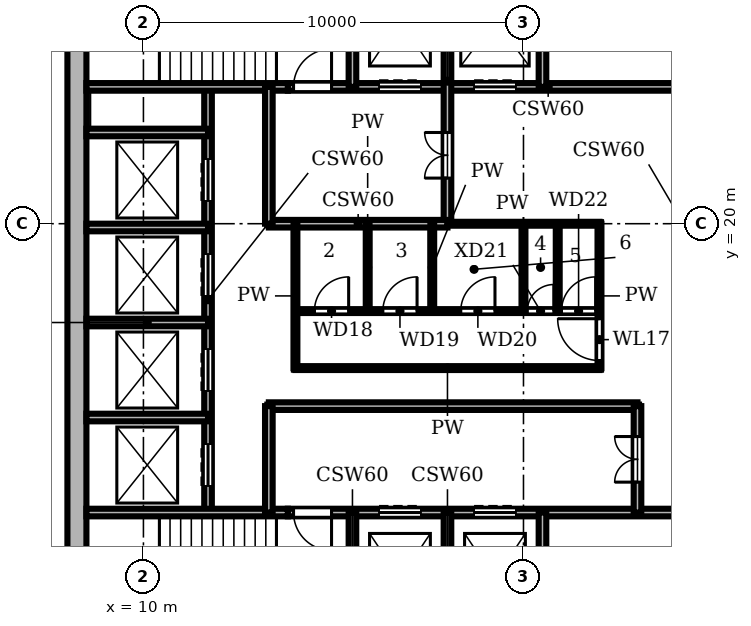
"""IFC4 building model, lengths in metres.
Left out: names, types, materials, properties, quantities, classifications, styles, units other than length and angle.
Written with IfcOpenShell. Run it as: python <this file> out.ifc"""

import sys

from ifc_helpers import new_model, si_unit, direction, frame, frame_2d, origin, place, context, subcontext, project, spatial, rectangle, extrude, element, fill, save


model = new_model("IFC4")
c1 = context("Model", 3, precision=1e-05, world=origin(), true_north=direction((0.0, 1.0)))
c2 = subcontext(c1, "Body", "Model", "MODEL_VIEW")
j1 = project(units=[si_unit("LENGTHUNIT", "METRE"), si_unit("PLANEANGLEUNIT", "RADIAN")], contexts=[c1])
p1 = place(None, origin())
s1 = spatial("IfcSite", under=j1, at=p1, CompositionType="ELEMENT")
p2 = place(p1, origin())
s2 = spatial("IfcBuilding", under=s1, at=p2, CompositionType="ELEMENT")
p3 = place(p2, frame((0.0, 0.0, 274.8)))
s3 = spatial("IfcBuildingStorey", under=s2, at=p3, CompositionType="ELEMENT", Elevation=274.8)
p4 = place(p3, frame((8.25, 27.5, 0.0), z_axis=(0.0, 0.0, 1.0), x_axis=(0.0, -1.0, 0.0)))
e1 = element("IfcWall", 1, at=p4, inside=s3, PredefinedType="SHEAR", context=c2, shape_type="SweptSolid", body=[
    extrude(rectangle(XDim=19.0, YDim=0.5, at=frame_2d((9.5, 0.0))), origin(), (0.0, 0.0, 1.0), 3.9),
])
p5 = place(p3, frame((8.5, 12.4, 0.0), z_axis=(0.0, 0.0, 1.0), x_axis=(1.0, 0.0, 0.0)))
e2 = element("IfcWall", 2, at=p5, inside=s3, PredefinedType="SHEAR", context=c2, shape_type="SweptSolid", body=[
    extrude(rectangle(XDim=5.3, YDim=0.2, at=frame_2d((2.65, 0.0))), origin(), (0.0, 0.0, 1.0), 3.58),
])
p6 = place(p3, frame((13.8, 12.4, 0.0), z_axis=(0.0, 0.0, 1.0), x_axis=(1.0, 0.0, 0.0)))
e3 = element("IfcWall", 3, at=p6, inside=s3, PredefinedType="SHEAR", context=c2, shape_type="SweptSolid", body=[
    extrude(rectangle(XDim=13.7, YDim=0.2, at=frame_2d((6.85, 0.0))), origin(), (0.0, 0.0, 1.0), 3.58),
])
p7 = place(p6, frame((2.4, 0.0, 0.0)))
e4 = element("IfcOpeningElement", 4, at=p7, cuts=e3, PredefinedType="OPENING", context=c2, shape_type="SweptSolid", body=[
    extrude(rectangle(XDim=1.1, YDim=2.1, at=frame_2d((0.55, 1.05))), frame((0.0, 0.11, 0.0), z_axis=(0.0, -1.0, 0.0), x_axis=(1.0, 0.0, 0.0)), (0.0, 0.0, 1.0), 0.22),
])
p8 = place(p6, frame((4.9, 0.0, 0.0)))
e5 = element("IfcOpeningElement", 5, at=p8, cuts=e3, PredefinedType="OPENING", context=c2, shape_type="SweptSolid", body=[
    extrude(rectangle(XDim=1.1, YDim=2.1, at=frame_2d((0.55, 1.05))), frame((0.0, 0.11, 0.0), z_axis=(0.0, -1.0, 0.0), x_axis=(1.0, 0.0, 0.0)), (0.0, 0.0, 1.0), 0.22),
])
p9 = place(p6, frame((0.15, 0.0, 0.0)))
e6 = element("IfcOpeningElement", 6, at=p9, cuts=e3, PredefinedType="OPENING", context=c2, shape_type="SweptSolid", body=[
    extrude(rectangle(XDim=1.0, YDim=2.1, at=frame_2d((0.5, 1.05))), frame((0.0, 0.11, 0.0), z_axis=(0.0, -1.0, 0.0), x_axis=(1.0, 0.0, 0.0)), (0.0, 0.0, 1.0), 0.22),
])
p10 = place(p3, frame((8.5, 14.9, 0.0), z_axis=(0.0, 0.0, 1.0), x_axis=(1.0, 0.0, 0.0)))
e7 = element("IfcWall", 7, at=p10, inside=s3, PredefinedType="SHEAR", context=c2, shape_type="SweptSolid", body=[
    extrude(rectangle(XDim=3.2, YDim=0.2, at=frame_2d((1.6, 0.0))), origin(), (0.0, 0.0, 1.0), 3.58),
])
p11 = place(p3, frame((13.3, 15.2, 0.0), z_axis=(0.0, 0.0, 1.0), x_axis=(1.0, 0.0, 0.0)))
e8 = element("IfcWall", 8, at=p11, inside=s3, PredefinedType="SHEAR", context=c2, shape_type="SweptSolid", body=[
    extrude(rectangle(XDim=9.7, YDim=0.2, at=frame_2d((4.85, 0.0))), origin(), (0.0, 0.0, 1.0), 3.58),
])
p12 = place(p3, frame((14.0, 16.2, 0.0), z_axis=(0.0, 0.0, 1.0), x_axis=(1.0, 0.0, 0.0)))
e9 = element("IfcWall", 9, at=p12, inside=s3, PredefinedType="PARTITIONING", context=c2, shape_type="SweptSolid", body=[
    extrude(rectangle(XDim=8.0, YDim=0.1, at=frame_2d((4.0, 0.0))), origin(), (0.0, 0.0, 1.0), 3.58),
])
p13 = place(p3, frame((8.5, 17.4, 0.0), z_axis=(0.0, 0.0, 1.0), x_axis=(1.0, 0.0, 0.0)))
e10 = element("IfcWall", 10, at=p13, inside=s3, PredefinedType="SHEAR", context=c2, shape_type="SweptSolid", body=[
    extrude(rectangle(XDim=3.2, YDim=0.2, at=frame_2d((1.6, 0.0))), origin(), (0.0, 0.0, 1.0), 3.58),
])
p14 = place(p3, frame((14.0, 17.7, 0.0), z_axis=(0.0, 0.0, 1.0), x_axis=(1.0, 0.0, 0.0)))
e11 = element("IfcWall", 11, at=p14, inside=s3, PredefinedType="PARTITIONING", context=c2, shape_type="SweptSolid", body=[
    extrude(rectangle(XDim=8.0, YDim=0.1, at=frame_2d((4.0, 0.0))), origin(), (0.0, 0.0, 1.0), 3.58),
])
p15 = place(p14, frame((0.5, 0.0, 0.0)))
e12 = element("IfcOpeningElement", 12, at=p15, cuts=e11, PredefinedType="OPENING", context=c2, shape_type="SweptSolid", body=[
    extrude(rectangle(XDim=0.9, YDim=2.1, at=frame_2d((0.45, 1.05))), frame((0.0, 0.06, 0.0), z_axis=(0.0, -1.0, 0.0), x_axis=(1.0, 0.0, 0.0)), (0.0, 0.0, 1.0), 0.12),
])
p16 = place(p14, frame((2.3, 0.0, 0.0)))
e13 = element("IfcOpeningElement", 13, at=p16, cuts=e11, PredefinedType="OPENING", context=c2, shape_type="SweptSolid", body=[
    extrude(rectangle(XDim=0.9, YDim=2.1, at=frame_2d((0.45, 1.05))), frame((0.0, 0.06, 0.0), z_axis=(0.0, -1.0, 0.0), x_axis=(1.0, 0.0, 0.0)), (0.0, 0.0, 1.0), 0.12),
])
p17 = place(p14, frame((4.35, 0.0, 0.0)))
e14 = element("IfcOpeningElement", 14, at=p17, cuts=e11, PredefinedType="OPENING", context=c2, shape_type="SweptSolid", body=[
    extrude(rectangle(XDim=0.9, YDim=2.1, at=frame_2d((0.45, 1.05))), frame((0.0, 0.06, 0.0), z_axis=(0.0, -1.0, 0.0), x_axis=(1.0, 0.0, 0.0)), (0.0, 0.0, 1.0), 0.12),
])
p18 = place(p14, frame((6.1, 0.0, 0.0)))
e15 = element("IfcOpeningElement", 15, at=p18, cuts=e11, PredefinedType="OPENING", context=c2, shape_type="SweptSolid", body=[
    extrude(rectangle(XDim=0.7, YDim=2.1, at=frame_2d((0.35, 1.05))), frame((0.0, 0.06, 0.0), z_axis=(0.0, -1.0, 0.0), x_axis=(1.0, 0.0, 0.0)), (0.0, 0.0, 1.0), 0.12),
])
p19 = place(p14, frame((7.0, 0.0, 0.0)))
e16 = element("IfcOpeningElement", 16, at=p19, cuts=e11, PredefinedType="OPENING", context=c2, shape_type="SweptSolid", body=[
    extrude(rectangle(XDim=0.9, YDim=2.1, at=frame_2d((0.45, 1.05))), frame((0.0, 0.06, 0.0), z_axis=(0.0, -1.0, 0.0), x_axis=(1.0, 0.0, 0.0)), (0.0, 0.0, 1.0), 0.12),
])
p20 = place(p3, frame((8.5, 19.9, 0.0), z_axis=(0.0, 0.0, 1.0), x_axis=(1.0, 0.0, 0.0)))
e17 = element("IfcWall", 17, at=p20, inside=s3, PredefinedType="SHEAR", context=c2, shape_type="SweptSolid", body=[
    extrude(rectangle(XDim=3.2, YDim=0.2, at=frame_2d((1.6, 0.0))), origin(), (0.0, 0.0, 1.0), 3.58),
])
p21 = place(p3, frame((18.0, 20.0, 0.0), z_axis=(0.0, 0.0, 1.0), x_axis=(1.0, 0.0, 0.0)))
e18 = element("IfcWall", 18, at=p21, inside=s3, PredefinedType="PARTITIONING", context=c2, shape_type="SweptSolid", body=[
    extrude(rectangle(XDim=4.0, YDim=0.1, at=frame_2d((2.0, 0.0))), origin(), (0.0, 0.0, 1.0), 3.58),
])
p22 = place(p3, frame((13.3, 20.0, 0.0), z_axis=(0.0, 0.0, 1.0), x_axis=(1.0, 0.0, 0.0)))
e19 = element("IfcWall", 19, at=p22, inside=s3, PredefinedType="SHEAR", context=c2, shape_type="SweptSolid", body=[
    extrude(rectangle(XDim=4.7, YDim=0.2, at=frame_2d((2.35, 0.0))), origin(), (0.0, 0.0, 1.0), 3.58),
])
p23 = place(p3, frame((8.5, 22.4, 0.0), z_axis=(0.0, 0.0, 1.0), x_axis=(1.0, 0.0, 0.0)))
e20 = element("IfcWall", 20, at=p23, inside=s3, PredefinedType="SHEAR", context=c2, shape_type="SweptSolid", body=[
    extrude(rectangle(XDim=3.2, YDim=0.2, at=frame_2d((1.6, 0.0))), origin(), (0.0, 0.0, 1.0), 3.58),
])
p24 = place(p3, frame((8.5, 23.6, 0.0), z_axis=(0.0, 0.0, 1.0), x_axis=(1.0, 0.0, 0.0)))
e21 = element("IfcWall", 21, at=p24, inside=s3, PredefinedType="SHEAR", context=c2, shape_type="SweptSolid", body=[
    extrude(rectangle(XDim=5.3, YDim=0.2, at=frame_2d((2.65, 0.0))), origin(), (0.0, 0.0, 1.0), 3.58),
])
p25 = place(p3, frame((13.8, 23.6, 0.0), z_axis=(0.0, 0.0, 1.0), x_axis=(1.0, 0.0, 0.0)))
e22 = element("IfcWall", 22, at=p25, inside=s3, PredefinedType="SHEAR", context=c2, shape_type="SweptSolid", body=[
    extrude(rectangle(XDim=13.7, YDim=0.2, at=frame_2d((6.85, 0.0))), origin(), (0.0, 0.0, 1.0), 3.58),
])
p26 = place(p25, frame((2.4, 0.0, 0.0)))
e23 = element("IfcOpeningElement", 23, at=p26, cuts=e22, PredefinedType="OPENING", context=c2, shape_type="SweptSolid", body=[
    extrude(rectangle(XDim=1.1, YDim=2.1, at=frame_2d((0.55, 1.05))), frame((0.0, 0.11, 0.0), z_axis=(0.0, -1.0, 0.0), x_axis=(1.0, 0.0, 0.0)), (0.0, 0.0, 1.0), 0.22),
])
p27 = place(p25, frame((4.9, 0.0, 0.0)))
e24 = element("IfcOpeningElement", 24, at=p27, cuts=e22, PredefinedType="OPENING", context=c2, shape_type="SweptSolid", body=[
    extrude(rectangle(XDim=1.1, YDim=2.1, at=frame_2d((0.55, 1.05))), frame((0.0, 0.11, 0.0), z_axis=(0.0, -1.0, 0.0), x_axis=(1.0, 0.0, 0.0)), (0.0, 0.0, 1.0), 0.22),
])
p28 = place(p25, frame((0.15, 0.0, 0.0)))
e25 = element("IfcOpeningElement", 25, at=p28, cuts=e22, PredefinedType="OPENING", context=c2, shape_type="SweptSolid", body=[
    extrude(rectangle(XDim=1.0, YDim=2.1, at=frame_2d((0.5, 1.05))), frame((0.0, 0.11, 0.0), z_axis=(0.0, -1.0, 0.0), x_axis=(1.0, 0.0, 0.0)), (0.0, 0.0, 1.0), 0.22),
])
p29 = place(p3, frame((11.7, 12.4, 0.0), z_axis=(0.0, 0.0, 1.0), x_axis=(0.0, 1.0, 0.0)))
e26 = element("IfcWall", 26, at=p29, inside=s3, PredefinedType="SHEAR", context=c2, shape_type="SweptSolid", body=[
    extrude(rectangle(XDim=11.2, YDim=0.2, at=frame_2d((5.6, 0.0))), origin(), (0.0, 0.0, 1.0), 3.58),
])
p30 = place(p29, frame((0.7, 0.0, 0.0)))
e27 = element("IfcOpeningElement", 27, at=p30, cuts=e26, PredefinedType="OPENING", context=c2, shape_type="SweptSolid", body=[
    extrude(rectangle(XDim=1.1, YDim=2.1, at=frame_2d((0.55, 1.05))), frame((0.0, 0.11, 0.0), z_axis=(0.0, -1.0, 0.0), x_axis=(1.0, 0.0, 0.0)), (0.0, 0.0, 1.0), 0.22),
])
p31 = place(p29, frame((3.2, 0.0, 0.0)))
e28 = element("IfcOpeningElement", 28, at=p31, cuts=e26, PredefinedType="OPENING", context=c2, shape_type="SweptSolid", body=[
    extrude(rectangle(XDim=1.1, YDim=2.1, at=frame_2d((0.55, 1.05))), frame((0.0, 0.11, 0.0), z_axis=(0.0, -1.0, 0.0), x_axis=(1.0, 0.0, 0.0)), (0.0, 0.0, 1.0), 0.22),
])
p32 = place(p29, frame((5.7, 0.0, 0.0)))
e29 = element("IfcOpeningElement", 29, at=p32, cuts=e26, PredefinedType="OPENING", context=c2, shape_type="SweptSolid", body=[
    extrude(rectangle(XDim=1.1, YDim=2.1, at=frame_2d((0.55, 1.05))), frame((0.0, 0.11, 0.0), z_axis=(0.0, -1.0, 0.0), x_axis=(1.0, 0.0, 0.0)), (0.0, 0.0, 1.0), 0.22),
])
p33 = place(p29, frame((8.2, 0.0, 0.0)))
e30 = element("IfcOpeningElement", 30, at=p33, cuts=e26, PredefinedType="OPENING", context=c2, shape_type="SweptSolid", body=[
    extrude(rectangle(XDim=1.1, YDim=2.1, at=frame_2d((0.55, 1.05))), frame((0.0, 0.11, 0.0), z_axis=(0.0, -1.0, 0.0), x_axis=(1.0, 0.0, 0.0)), (0.0, 0.0, 1.0), 0.22),
])
p34 = place(p3, frame((13.3, 12.4, 0.0), z_axis=(0.0, 0.0, 1.0), x_axis=(0.0, 1.0, 0.0)))
e31 = element("IfcWall", 31, at=p34, inside=s3, PredefinedType="SHEAR", context=c2, shape_type="SweptSolid", body=[
    extrude(rectangle(XDim=2.8, YDim=0.2, at=frame_2d((1.4, 0.0))), origin(), (0.0, 0.0, 1.0), 3.58),
])
p35 = place(p3, frame((13.3, 20.0, 0.0), z_axis=(0.0, 0.0, 1.0), x_axis=(0.0, 1.0, 0.0)))
e32 = element("IfcWall", 32, at=p35, inside=s3, PredefinedType="SHEAR", context=c2, shape_type="SweptSolid", body=[
    extrude(rectangle(XDim=3.6, YDim=0.2, at=frame_2d((1.8, 0.0))), origin(), (0.0, 0.0, 1.0), 3.58),
])
p36 = place(p3, frame((14.0, 16.2, 0.0), z_axis=(0.0, 0.0, 1.0), x_axis=(0.0, 1.0, 0.0)))
e33 = element("IfcWall", 33, at=p36, inside=s3, PredefinedType="PARTITIONING", context=c2, shape_type="SweptSolid", body=[
    extrude(rectangle(XDim=3.8, YDim=0.1, at=frame_2d((1.9, 0.0))), origin(), (0.0, 0.0, 1.0), 3.58),
])
for number, where, z_axis, x_axis in (
    (34, (15.5, 8.5, 0.0), (0.0, 0.0, 1.0), (0.0, 1.0, 0.0)),
    (35, (15.5, 23.6, 0.0), (0.0, 0.0, 1.0), (0.0, 1.0, 0.0)),
):
    element("IfcWall", number, at=place(p3, frame(where, z_axis=z_axis, x_axis=x_axis)), inside=s3, PredefinedType="SHEAR", context=c2, shape_type="SweptSolid", body=[
        extrude(rectangle(XDim=3.9, YDim=0.2, at=frame_2d((1.95, 0.0))), origin(), (0.0, 0.0, 1.0), 3.58),
    ])
for number, where, z_axis, x_axis in (
    (36, (15.9, 17.7, 0.0), (0.0, 0.0, 1.0), (0.0, 1.0, 0.0)),
    (37, (17.6, 17.7, 0.0), (0.0, 0.0, 1.0), (0.0, 1.0, 0.0)),
):
    element("IfcWall", number, at=place(p3, frame(where, z_axis=z_axis, x_axis=x_axis)), inside=s3, PredefinedType="PARTITIONING", context=c2, shape_type="SweptSolid", body=[
        extrude(rectangle(XDim=2.3, YDim=0.1, at=frame_2d((1.15, 0.0))), origin(), (0.0, 0.0, 1.0), 3.58),
    ])
p37 = place(p3, frame((18.0, 8.5, 0.0), z_axis=(0.0, 0.0, 1.0), x_axis=(0.0, 1.0, 0.0)))
e38 = element("IfcWall", 38, at=p37, inside=s3, PredefinedType="SHEAR", context=c2, shape_type="SweptSolid", body=[
    extrude(rectangle(XDim=3.9, YDim=0.2, at=frame_2d((1.95, 0.0))), origin(), (0.0, 0.0, 1.0), 3.58),
])
p38 = place(p3, frame((18.0, 20.0, 0.0), z_axis=(0.0, 0.0, 1.0), x_axis=(0.0, 1.0, 0.0)))
e39 = element("IfcWall", 39, at=p38, inside=s3, PredefinedType="SHEAR", context=c2, shape_type="SweptSolid", body=[
    extrude(rectangle(XDim=7.5, YDim=0.2, at=frame_2d((3.75, 0.0))), origin(), (0.0, 0.0, 1.0), 3.58),
])
p39 = place(p38, frame((1.2, 0.0, 0.0)))
e40 = element("IfcOpeningElement", 40, at=p39, cuts=e39, PredefinedType="OPENING", context=c2, shape_type="SweptSolid", body=[
    extrude(rectangle(XDim=1.2, YDim=2.1, at=frame_2d((0.6, 1.05))), frame((0.0, 0.11, 0.0), z_axis=(0.0, -1.0, 0.0), x_axis=(1.0, 0.0, 0.0)), (0.0, 0.0, 1.0), 0.22),
])
p40 = place(p3, frame((20.0, 17.7, 0.0), z_axis=(0.0, 0.0, 1.0), x_axis=(0.0, 1.0, 0.0)))
e41 = element("IfcWall", 41, at=p40, inside=s3, PredefinedType="PARTITIONING", context=c2, shape_type="SweptSolid", body=[
    extrude(rectangle(XDim=2.3, YDim=0.1, at=frame_2d((1.15, 0.0))), origin(), (0.0, 0.0, 1.0), 3.58),
])
for number, where, z_axis, x_axis in (
    (42, (20.5, 8.5, 0.0), (0.0, 0.0, 1.0), (0.0, 1.0, 0.0)),
    (43, (20.5, 23.6, 0.0), (0.0, 0.0, 1.0), (0.0, 1.0, 0.0)),
):
    element("IfcWall", number, at=place(p3, frame(where, z_axis=z_axis, x_axis=x_axis)), inside=s3, PredefinedType="SHEAR", context=c2, shape_type="SweptSolid", body=[
        extrude(rectangle(XDim=3.9, YDim=0.2, at=frame_2d((1.95, 0.0))), origin(), (0.0, 0.0, 1.0), 3.58),
    ])
p41 = place(p3, frame((20.9, 17.7, 0.0), z_axis=(0.0, 0.0, 1.0), x_axis=(0.0, 1.0, 0.0)))
e44 = element("IfcWall", 44, at=p41, inside=s3, PredefinedType="PARTITIONING", context=c2, shape_type="SweptSolid", body=[
    extrude(rectangle(XDim=2.3, YDim=0.1, at=frame_2d((1.15, 0.0))), origin(), (0.0, 0.0, 1.0), 3.58),
])
p42 = place(p3, frame((22.0, 16.2, 0.0), z_axis=(0.0, 0.0, 1.0), x_axis=(0.0, 1.0, 0.0)))
e45 = element("IfcWall", 45, at=p42, inside=s3, PredefinedType="PARTITIONING", context=c2, shape_type="SweptSolid", body=[
    extrude(rectangle(XDim=3.8, YDim=0.1, at=frame_2d((1.9, 0.0))), origin(), (0.0, 0.0, 1.0), 3.58),
])
p43 = place(p42, frame((0.2, 0.0, 0.0)))
e46 = element("IfcOpeningElement", 46, at=p43, cuts=e45, PredefinedType="OPENING", context=c2, shape_type="SweptSolid", body=[
    extrude(rectangle(XDim=1.1, YDim=2.1, at=frame_2d((0.55, 1.05))), frame((0.0, 0.06, 0.0), z_axis=(0.0, -1.0, 0.0), x_axis=(1.0, 0.0, 0.0)), (0.0, 0.0, 1.0), 0.12),
])
p44 = place(p3, frame((23.0, 12.4, 0.0), z_axis=(0.0, 0.0, 1.0), x_axis=(0.0, 1.0, 0.0)))
e47 = element("IfcWall", 47, at=p44, inside=s3, PredefinedType="SHEAR", context=c2, shape_type="SweptSolid", body=[
    extrude(rectangle(XDim=2.8, YDim=0.2, at=frame_2d((1.4, 0.0))), origin(), (0.0, 0.0, 1.0), 3.58),
])
p45 = place(p44, frame((0.8, 0.0, 0.0)))
e48 = element("IfcOpeningElement", 48, at=p45, cuts=e47, PredefinedType="OPENING", context=c2, shape_type="SweptSolid", body=[
    extrude(rectangle(XDim=1.2, YDim=2.1, at=frame_2d((0.6, 1.05))), frame((0.0, 0.11, 0.0), z_axis=(0.0, -1.0, 0.0), x_axis=(1.0, 0.0, 0.0)), (0.0, 0.0, 1.0), 0.22),
])
p46 = place(p30, origin())
e49 = element("IfcDoor", 49, at=p46, inside=s3, OperationType="DOUBLE_DOOR_SLIDING", PredefinedType="DOOR", context=c2, shape_type="SweptSolid", body=[
    extrude(rectangle(XDim=1.1, YDim=2.1, at=frame_2d((0.55, 1.05))), frame((0.0, 0.025, 0.0), z_axis=(0.0, -1.0, 0.0), x_axis=(1.0, 0.0, 0.0)), (0.0, 0.0, 1.0), 0.05),
])
fill(e27, e49)
p47 = place(p31, origin())
e50 = element("IfcDoor", 50, at=p47, inside=s3, OperationType="DOUBLE_DOOR_SLIDING", PredefinedType="DOOR", context=c2, shape_type="SweptSolid", body=[
    extrude(rectangle(XDim=1.1, YDim=2.1, at=frame_2d((0.55, 1.05))), frame((0.0, 0.025, 0.0), z_axis=(0.0, -1.0, 0.0), x_axis=(1.0, 0.0, 0.0)), (0.0, 0.0, 1.0), 0.05),
])
fill(e28, e50)
p48 = place(p32, origin())
e51 = element("IfcDoor", 51, at=p48, inside=s3, OperationType="DOUBLE_DOOR_SLIDING", PredefinedType="DOOR", context=c2, shape_type="SweptSolid", body=[
    extrude(rectangle(XDim=1.1, YDim=2.1, at=frame_2d((0.55, 1.05))), frame((0.0, 0.025, 0.0), z_axis=(0.0, -1.0, 0.0), x_axis=(1.0, 0.0, 0.0)), (0.0, 0.0, 1.0), 0.05),
])
fill(e29, e51)
p49 = place(p33, origin())
e52 = element("IfcDoor", 52, at=p49, inside=s3, OperationType="DOUBLE_DOOR_SLIDING", PredefinedType="DOOR", context=c2, shape_type="SweptSolid", body=[
    extrude(rectangle(XDim=1.1, YDim=2.1, at=frame_2d((0.55, 1.05))), frame((0.0, 0.025, 0.0), z_axis=(0.0, -1.0, 0.0), x_axis=(1.0, 0.0, 0.0)), (0.0, 0.0, 1.0), 0.05),
])
fill(e30, e52)
p50 = place(p7, origin())
e53 = element("IfcDoor", 53, at=p50, inside=s3, OperationType="DOUBLE_DOOR_SLIDING", PredefinedType="DOOR", context=c2, shape_type="SweptSolid", body=[
    extrude(rectangle(XDim=1.1, YDim=2.1, at=frame_2d((0.55, 1.05))), frame((0.0, 0.025, 0.0), z_axis=(0.0, -1.0, 0.0), x_axis=(1.0, 0.0, 0.0)), (0.0, 0.0, 1.0), 0.05),
])
fill(e4, e53)
p51 = place(p8, origin())
e54 = element("IfcDoor", 54, at=p51, inside=s3, OperationType="DOUBLE_DOOR_SLIDING", PredefinedType="DOOR", context=c2, shape_type="SweptSolid", body=[
    extrude(rectangle(XDim=1.1, YDim=2.1, at=frame_2d((0.55, 1.05))), frame((0.0, 0.025, 0.0), z_axis=(0.0, -1.0, 0.0), x_axis=(1.0, 0.0, 0.0)), (0.0, 0.0, 1.0), 0.05),
])
fill(e5, e54)
p52 = place(p26, origin())
e55 = element("IfcDoor", 55, at=p52, inside=s3, OperationType="DOUBLE_DOOR_SLIDING", PredefinedType="DOOR", context=c2, shape_type="SweptSolid", body=[
    extrude(rectangle(XDim=1.1, YDim=2.1, at=frame_2d((0.55, 1.05))), frame((0.0, 0.025, 0.0), z_axis=(0.0, -1.0, 0.0), x_axis=(1.0, 0.0, 0.0)), (0.0, 0.0, 1.0), 0.05),
])
fill(e23, e55)
p53 = place(p27, origin())
e56 = element("IfcDoor", 56, at=p53, inside=s3, OperationType="DOUBLE_DOOR_SLIDING", PredefinedType="DOOR", context=c2, shape_type="SweptSolid", body=[
    extrude(rectangle(XDim=1.1, YDim=2.1, at=frame_2d((0.55, 1.05))), frame((0.0, 0.025, 0.0), z_axis=(0.0, -1.0, 0.0), x_axis=(1.0, 0.0, 0.0)), (0.0, 0.0, 1.0), 0.05),
])
fill(e24, e56)
p54 = place(p9, frame((1.0, 0.0, 0.0), z_axis=(0.0, 0.0, 1.0), x_axis=(-1.0, 0.0, 0.0)))
e57 = element("IfcDoor", 57, at=p54, inside=s3, OperationType="SINGLE_SWING_LEFT", PredefinedType="DOOR", context=c2, shape_type="SweptSolid", body=[
    extrude(rectangle(XDim=1.0, YDim=2.1, at=frame_2d((0.5, 1.05))), frame((0.0, 0.025, 0.0), z_axis=(0.0, -1.0, 0.0), x_axis=(1.0, 0.0, 0.0)), (0.0, 0.0, 1.0), 0.05),
])
fill(e6, e57)
p55 = place(p28, origin())
e58 = element("IfcDoor", 58, at=p55, inside=s3, OperationType="SINGLE_SWING_RIGHT", PredefinedType="DOOR", context=c2, shape_type="SweptSolid", body=[
    extrude(rectangle(XDim=1.0, YDim=2.1, at=frame_2d((0.5, 1.05))), frame((0.0, 0.025, 0.0), z_axis=(0.0, -1.0, 0.0), x_axis=(1.0, 0.0, 0.0)), (0.0, 0.0, 1.0), 0.05),
])
fill(e25, e58)
p56 = place(p45, origin())
e59 = element("IfcDoor", 59, at=p56, inside=s3, OperationType="DOUBLE_DOOR_SINGLE_SWING", PredefinedType="DOOR", context=c2, shape_type="SweptSolid", body=[
    extrude(rectangle(XDim=1.2, YDim=2.1, at=frame_2d((0.6, 1.05))), frame((0.0, 0.025, 0.0), z_axis=(0.0, -1.0, 0.0), x_axis=(1.0, 0.0, 0.0)), (0.0, 0.0, 1.0), 0.05),
])
fill(e48, e59)
p57 = place(p39, origin())
e60 = element("IfcDoor", 60, at=p57, inside=s3, OperationType="DOUBLE_DOOR_SINGLE_SWING", PredefinedType="DOOR", context=c2, shape_type="SweptSolid", body=[
    extrude(rectangle(XDim=1.2, YDim=2.1, at=frame_2d((0.6, 1.05))), frame((0.0, 0.025, 0.0), z_axis=(0.0, -1.0, 0.0), x_axis=(1.0, 0.0, 0.0)), (0.0, 0.0, 1.0), 0.05),
])
fill(e40, e60)
p58 = place(p43, origin())
e61 = element("IfcDoor", 61, at=p58, inside=s3, OperationType="SINGLE_SWING_RIGHT", PredefinedType="DOOR", context=c2, shape_type="SweptSolid", body=[
    extrude(rectangle(XDim=1.1, YDim=2.1, at=frame_2d((0.55, 1.05))), frame((0.0, 0.025, 0.0), z_axis=(0.0, -1.0, 0.0), x_axis=(1.0, 0.0, 0.0)), (0.0, 0.0, 1.0), 0.05),
])
fill(e46, e61)
p59 = place(p15, origin())
e62 = element("IfcDoor", 62, at=p59, inside=s3, OperationType="SINGLE_SWING_RIGHT", PredefinedType="DOOR", context=c2, shape_type="SweptSolid", body=[
    extrude(rectangle(XDim=0.9, YDim=2.1, at=frame_2d((0.45, 1.05))), frame((0.0, 0.025, 0.0), z_axis=(0.0, -1.0, 0.0), x_axis=(1.0, 0.0, 0.0)), (0.0, 0.0, 1.0), 0.05),
])
fill(e12, e62)
p60 = place(p16, origin())
e63 = element("IfcDoor", 63, at=p60, inside=s3, OperationType="SINGLE_SWING_RIGHT", PredefinedType="DOOR", context=c2, shape_type="SweptSolid", body=[
    extrude(rectangle(XDim=0.9, YDim=2.1, at=frame_2d((0.45, 1.05))), frame((0.0, 0.025, 0.0), z_axis=(0.0, -1.0, 0.0), x_axis=(1.0, 0.0, 0.0)), (0.0, 0.0, 1.0), 0.05),
])
fill(e13, e63)
p61 = place(p17, origin())
e64 = element("IfcDoor", 64, at=p61, inside=s3, OperationType="SINGLE_SWING_RIGHT", PredefinedType="DOOR", context=c2, shape_type="SweptSolid", body=[
    extrude(rectangle(XDim=0.9, YDim=2.1, at=frame_2d((0.45, 1.05))), frame((0.0, 0.025, 0.0), z_axis=(0.0, -1.0, 0.0), x_axis=(1.0, 0.0, 0.0)), (0.0, 0.0, 1.0), 0.05),
])
fill(e14, e64)
p62 = place(p18, origin())
e65 = element("IfcDoor", 65, at=p62, inside=s3, OperationType="SINGLE_SWING_RIGHT", PredefinedType="DOOR", context=c2, shape_type="SweptSolid", body=[
    extrude(rectangle(XDim=0.7, YDim=2.1, at=frame_2d((0.35, 1.05))), frame((0.0, 0.025, 0.0), z_axis=(0.0, -1.0, 0.0), x_axis=(1.0, 0.0, 0.0)), (0.0, 0.0, 1.0), 0.05),
])
fill(e15, e65)
p63 = place(p19, origin())
e66 = element("IfcDoor", 66, at=p63, inside=s3, OperationType="SINGLE_SWING_RIGHT", PredefinedType="DOOR", context=c2, shape_type="SweptSolid", body=[
    extrude(rectangle(XDim=0.9, YDim=2.1, at=frame_2d((0.45, 1.05))), frame((0.0, 0.025, 0.0), z_axis=(0.0, -1.0, 0.0), x_axis=(1.0, 0.0, 0.0)), (0.0, 0.0, 1.0), 0.05),
])
fill(e16, e66)
save(model, sys.argv[1])
